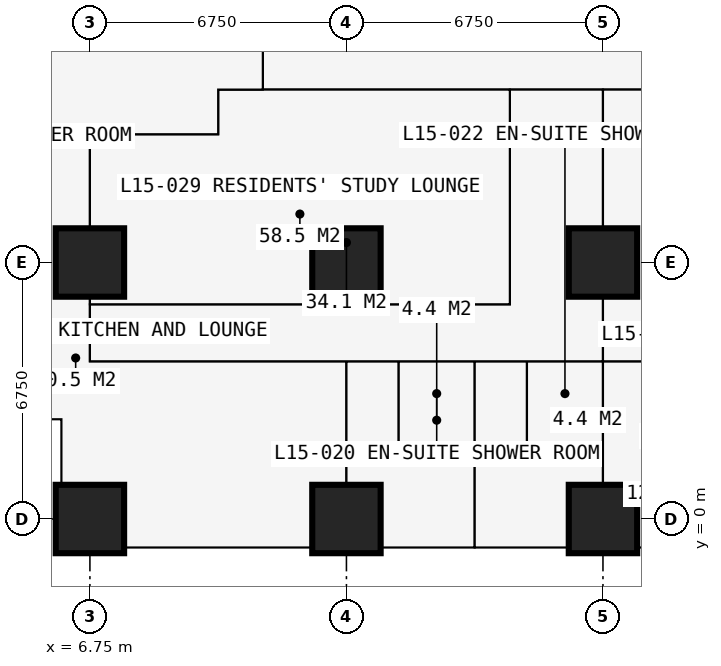
"""IFC4 building model, lengths in metres.
Left out: names, types, materials, properties, quantities, classifications, styles, units other than length and angle.
Written with IfcOpenShell. Run it as: python <this file> out.ifc"""

import sys

from ifc_helpers import new_model, si_unit, direction, frame, frame_2d, origin, origin_2d, place, context, subcontext, project, spatial, rectangle, extrude, element, fill, save


model = new_model("IFC4")
c1 = context("Model", 3, precision=1e-05, world=origin(), true_north=direction((0.0, 1.0)))
c2 = subcontext(c1, "Body", "Model", "MODEL_VIEW")
j1 = project(units=[si_unit("LENGTHUNIT", "METRE"), si_unit("PLANEANGLEUNIT", "RADIAN")], contexts=[c1])
p1 = place(None, origin())
s1 = spatial("IfcSite", under=j1, at=p1, CompositionType="ELEMENT")
p2 = place(p1, origin())
s2 = spatial("IfcBuilding", under=s1, at=p2, CompositionType="ELEMENT")
p3 = place(p2, frame((0.0, 0.0, 57.6)))
s3 = spatial("IfcBuildingStorey", under=s2, at=p3, CompositionType="ELEMENT", Elevation=57.6)
for number, where, z_axis, x_axis in (
    (1, (6.75, 0.0, 0.0), (0.0, 0.0, 1.0), (1.0, 0.0, 0.0)),
    (2, (6.75, 6.75, 0.0), (0.0, 0.0, 1.0), (1.0, 0.0, 0.0)),
    (3, (13.5, 0.0, 0.0), (0.0, 0.0, 1.0), (1.0, 0.0, 0.0)),
    (4, (13.5, 6.75, 0.0), (0.0, 0.0, 1.0), (1.0, 0.0, 0.0)),
    (5, (20.25, 0.0, 0.0), (0.0, 0.0, 1.0), (1.0, 0.0, 0.0)),
    (6, (20.25, 6.75, 0.0), (0.0, 0.0, 1.0), (1.0, 0.0, 0.0)),
):
    element("IfcColumn", number, at=place(p3, frame(where, z_axis=z_axis, x_axis=x_axis)), inside=s3, PredefinedType="COLUMN", context=c2, shape_type="SweptSolid", body=[
        extrude(rectangle(XDim=1.8, YDim=1.8, at=origin_2d()), origin(), (0.0, 0.0, 1.0), 3.6),
    ])
p4 = place(p3, frame((2.625, 2.625, 0.0), z_axis=(0.0, 0.0, 1.0), x_axis=(1.0, 0.0, 0.0)))
e7 = element("IfcWall", 7, at=p4, inside=s3, PredefinedType="SOLIDWALL", context=c2, shape_type="SweptSolid", body=[
    extrude(rectangle(XDim=3.375, YDim=0.3, at=frame_2d((1.688, 0.0))), origin(), (0.0, 0.0, 1.0), 3.375),
])
p5 = place(p4, frame((0.788, 0.0, 0.6)))
e8 = element("IfcOpeningElement", 8, at=p5, cuts=e7, PredefinedType="OPENING", context=c2, shape_type="SweptSolid", body=[
    extrude(rectangle(XDim=1.8, YDim=2.1, at=frame_2d((0.9, 1.05))), frame((0.0, 0.16, 0.0), z_axis=(0.0, -1.0, 0.0), x_axis=(1.0, 0.0, 0.0)), (0.0, 0.0, 1.0), 0.32),
])
p6 = place(p3, frame((6.0, 2.625, 0.0), z_axis=(0.0, 0.0, 1.0), x_axis=(0.0, -1.0, 0.0)))
e9 = element("IfcWall", 9, at=p6, inside=s3, PredefinedType="SOLIDWALL", context=c2, shape_type="SweptSolid", body=[
    extrude(rectangle(XDim=3.375, YDim=0.3, at=frame_2d((1.688, 0.0))), origin(), (0.0, 0.0, 1.0), 3.375),
])
p7 = place(p6, frame((0.343, 0.0, 0.9)))
e10 = element("IfcOpeningElement", 10, at=p7, cuts=e9, PredefinedType="OPENING", context=c2, shape_type="SweptSolid", body=[
    extrude(rectangle(XDim=1.2, YDim=1.8, at=frame_2d((0.6, 0.9))), frame((0.0, 0.16, 0.0), z_axis=(0.0, -1.0, 0.0), x_axis=(1.0, 0.0, 0.0)), (0.0, 0.0, 1.0), 0.32),
])
p8 = place(p3, frame((27.0, -0.75, 0.0), z_axis=(0.0, 0.0, 1.0), x_axis=(-1.0, 0.0, 0.0)))
e11 = element("IfcWall", 11, at=p8, inside=s3, PredefinedType="SOLIDWALL", context=c2, shape_type="SweptSolid", body=[
    extrude(rectangle(XDim=6.75, YDim=0.15, at=frame_2d((3.375, 0.0))), origin(), (0.0, 0.0, 1.0), 3.375),
])
p9 = place(p8, frame((0.962, 0.0, 0.0)))
e12 = element("IfcOpeningElement", 12, at=p9, cuts=e11, PredefinedType="OPENING", context=c2, shape_type="SweptSolid", body=[
    extrude(rectangle(XDim=1.0, YDim=2.2, at=frame_2d((0.5, 1.1))), frame((0.0, 0.085, 0.0), z_axis=(0.0, -1.0, 0.0), x_axis=(1.0, 0.0, 0.0)), (0.0, 0.0, 1.0), 0.17),
])
p10 = place(p8, frame((2.025, 0.0, 0.9)))
e13 = element("IfcOpeningElement", 13, at=p10, cuts=e11, PredefinedType="OPENING", context=c2, shape_type="SweptSolid", body=[
    extrude(rectangle(XDim=1.2, YDim=1.8, at=frame_2d((0.6, 0.9))), frame((0.0, 0.085, 0.0), z_axis=(0.0, -1.0, 0.0), x_axis=(1.0, 0.0, 0.0)), (0.0, 0.0, 1.0), 0.17),
])
p11 = place(p8, frame((4.788, 0.0, 0.0)))
e14 = element("IfcOpeningElement", 14, at=p11, cuts=e11, PredefinedType="OPENING", context=c2, shape_type="SweptSolid", body=[
    extrude(rectangle(XDim=1.0, YDim=2.2, at=frame_2d((0.5, 1.1))), frame((0.0, 0.085, 0.0), z_axis=(0.0, -1.0, 0.0), x_axis=(1.0, 0.0, 0.0)), (0.0, 0.0, 1.0), 0.17),
])
p12 = place(p8, frame((3.525, 0.0, 0.9)))
e15 = element("IfcOpeningElement", 15, at=p12, cuts=e11, PredefinedType="OPENING", context=c2, shape_type="SweptSolid", body=[
    extrude(rectangle(XDim=1.2, YDim=1.8, at=frame_2d((0.6, 0.9))), frame((0.0, 0.085, 0.0), z_axis=(0.0, -1.0, 0.0), x_axis=(1.0, 0.0, 0.0)), (0.0, 0.0, 1.0), 0.17),
])
p13 = place(p3, frame((-0.734, 10.125, 0.0), z_axis=(0.0, 0.0, 1.0), x_axis=(1.0, 0.0, 0.0)))
e16 = element("IfcWall", 16, at=p13, inside=s3, PredefinedType="PARTITIONING", context=c2, shape_type="SweptSolid", body=[
    extrude(rectangle(XDim=10.859, YDim=0.15, at=frame_2d((5.429, 0.0))), origin(), (0.0, 0.0, 1.0), 3.375),
])
p14 = place(p3, frame((6.75, 4.15, 0.0), z_axis=(0.0, 0.0, 1.0), x_axis=(0.0, 1.0, 0.0)))
e17 = element("IfcWall", 17, at=p14, inside=s3, PredefinedType="PARTITIONING", context=c2, shape_type="SweptSolid", body=[
    extrude(rectangle(XDim=5.975, YDim=0.15, at=frame_2d((2.988, 0.0))), origin(), (0.0, 0.0, 1.0), 2.877),
])
p15 = place(p3, frame((6.75, 4.15, 0.0), z_axis=(0.0, 0.0, 1.0), x_axis=(1.0, 0.0, 0.0)))
e18 = element("IfcWall", 18, at=p15, inside=s3, PredefinedType="PARTITIONING", context=c2, shape_type="SweptSolid", body=[
    extrude(rectangle(XDim=23.625, YDim=0.1, at=frame_2d((11.812, 0.0))), origin(), (0.0, 0.0, 1.0), 3.375),
])
p16 = place(p15, frame((2.85, 0.0, 0.0)))
e19 = element("IfcOpeningElement", 19, at=p16, cuts=e18, PredefinedType="OPENING", context=c2, shape_type="SweptSolid", body=[
    extrude(rectangle(XDim=1.0, YDim=2.2, at=frame_2d((0.5, 1.1))), frame((0.0, 0.06, 0.0), z_axis=(0.0, -1.0, 0.0), x_axis=(1.0, 0.0, 0.0)), (0.0, 0.0, 1.0), 0.12),
])
p17 = place(p15, frame((6.95, 0.0, 0.0)))
e20 = element("IfcOpeningElement", 20, at=p17, cuts=e18, PredefinedType="OPENING", context=c2, shape_type="SweptSolid", body=[
    extrude(rectangle(XDim=0.95, YDim=2.2, at=frame_2d((0.475, 1.1))), frame((0.0, 0.06, 0.0), z_axis=(0.0, -1.0, 0.0), x_axis=(1.0, 0.0, 0.0)), (0.0, 0.0, 1.0), 0.12),
])
p18 = place(p15, frame((10.375, 0.0, 0.0)))
e21 = element("IfcOpeningElement", 21, at=p18, cuts=e18, PredefinedType="OPENING", context=c2, shape_type="SweptSolid", body=[
    extrude(rectangle(XDim=0.95, YDim=2.2, at=frame_2d((0.475, 1.1))), frame((0.0, 0.06, 0.0), z_axis=(0.0, -1.0, 0.0), x_axis=(1.0, 0.0, 0.0)), (0.0, 0.0, 1.0), 0.12),
])
p19 = place(p15, frame((18.475, 0.0, 0.0)))
e22 = element("IfcOpeningElement", 22, at=p19, cuts=e18, PredefinedType="OPENING", context=c2, shape_type="SweptSolid", body=[
    extrude(rectangle(XDim=0.95, YDim=2.2, at=frame_2d((0.475, 1.1))), frame((0.0, 0.06, 0.0), z_axis=(0.0, -1.0, 0.0), x_axis=(1.0, 0.0, 0.0)), (0.0, 0.0, 1.0), 0.12),
])
p20 = place(p15, frame((13.7, 0.0, 0.0)))
e23 = element("IfcOpeningElement", 23, at=p20, cuts=e18, PredefinedType="OPENING", context=c2, shape_type="SweptSolid", body=[
    extrude(rectangle(XDim=0.95, YDim=2.2, at=frame_2d((0.475, 1.1))), frame((0.0, 0.06, 0.0), z_axis=(0.0, -1.0, 0.0), x_axis=(1.0, 0.0, 0.0)), (0.0, 0.0, 1.0), 0.12),
])
p21 = place(p3, frame((6.75, 5.65, 0.0), z_axis=(0.0, 0.0, 1.0), x_axis=(1.0, 0.0, 0.0)))
e24 = element("IfcWall", 24, at=p21, inside=s3, PredefinedType="PARTITIONING", context=c2, shape_type="SweptSolid", body=[
    extrude(rectangle(XDim=11.05, YDim=0.15, at=frame_2d((5.525, 0.0))), origin(), (0.0, 0.0, 1.0), 3.375),
])
p22 = place(p3, frame((10.125, 10.125, 0.0), z_axis=(0.0, 0.0, 1.0), x_axis=(0.0, 1.0, 0.0)))
e25 = element("IfcWall", 25, at=p22, inside=s3, PredefinedType="PARTITIONING", context=c2, shape_type="SweptSolid", body=[
    extrude(rectangle(XDim=1.175, YDim=0.15, at=frame_2d((0.587, 0.0))), origin(), (0.0, 0.0, 1.0), 3.375),
])
p23 = place(p3, frame((10.125, 11.3, 0.0), z_axis=(0.0, 0.0, 1.0), x_axis=(1.0, 0.0, 0.0)))
e26 = element("IfcWall", 26, at=p23, inside=s3, PredefinedType="PARTITIONING", context=c2, shape_type="SweptSolid", body=[
    extrude(rectangle(XDim=20.675, YDim=0.15, at=frame_2d((10.337, 0.0))), origin(), (0.0, 0.0, 1.0), 3.375),
])
p24 = place(p23, frame((8.375, 0.0, 0.0)))
e27 = element("IfcOpeningElement", 27, at=p24, cuts=e26, PredefinedType="OPENING", context=c2, shape_type="SweptSolid", body=[
    extrude(rectangle(XDim=1.0, YDim=2.2, at=frame_2d((0.5, 1.1))), frame((0.0, 0.085, 0.0), z_axis=(0.0, -1.0, 0.0), x_axis=(1.0, 0.0, 0.0)), (0.0, 0.0, 1.0), 0.17),
])
p25 = place(p23, frame((10.975, 0.0, 0.0)))
e28 = element("IfcOpeningElement", 28, at=p25, cuts=e26, PredefinedType="OPENING", context=c2, shape_type="SweptSolid", body=[
    extrude(rectangle(XDim=1.0, YDim=2.2, at=frame_2d((0.5, 1.1))), frame((0.0, 0.085, 0.0), z_axis=(0.0, -1.0, 0.0), x_axis=(1.0, 0.0, 0.0)), (0.0, 0.0, 1.0), 0.17),
])
p26 = place(p23, frame((3.925, 0.0, 0.0)))
e29 = element("IfcOpeningElement", 29, at=p26, cuts=e26, PredefinedType="OPENING", context=c2, shape_type="SweptSolid", body=[
    extrude(rectangle(XDim=0.95, YDim=2.2, at=frame_2d((0.475, 1.1))), frame((0.0, 0.085, 0.0), z_axis=(0.0, -1.0, 0.0), x_axis=(1.0, 0.0, 0.0)), (0.0, 0.0, 1.0), 0.17),
])
p27 = place(p3, frame((11.3, 11.3, 0.0), z_axis=(0.0, 0.0, 1.0), x_axis=(0.0, 1.0, 0.0)))
e30 = element("IfcWall", 30, at=p27, inside=s3, PredefinedType="PARTITIONING", context=c2, shape_type="SweptSolid", body=[
    extrude(rectangle(XDim=19.075, YDim=0.15, at=frame_2d((9.538, 0.0))), origin(), (0.0, 0.0, 1.0), 3.375),
])
p28 = place(p27, frame((12.875, 0.0, 0.0)))
e31 = element("IfcOpeningElement", 31, at=p28, cuts=e30, PredefinedType="OPENING", context=c2, shape_type="SweptSolid", body=[
    extrude(rectangle(XDim=1.0, YDim=2.2, at=frame_2d((0.5, 1.1))), frame((0.0, 0.085, 0.0), z_axis=(0.0, -1.0, 0.0), x_axis=(1.0, 0.0, 0.0)), (0.0, 0.0, 1.0), 0.17),
])
p29 = place(p27, frame((10.438, 0.0, 0.0)))
e32 = element("IfcOpeningElement", 32, at=p29, cuts=e30, PredefinedType="OPENING", context=c2, shape_type="SweptSolid", body=[
    extrude(rectangle(XDim=1.0, YDim=2.2, at=frame_2d((0.5, 1.1))), frame((0.0, 0.085, 0.0), z_axis=(0.0, -1.0, 0.0), x_axis=(1.0, 0.0, 0.0)), (0.0, 0.0, 1.0), 0.17),
])
p30 = place(p27, frame((15.675, 0.0, 0.0)))
e33 = element("IfcOpeningElement", 33, at=p30, cuts=e30, PredefinedType="OPENING", context=c2, shape_type="SweptSolid", body=[
    extrude(rectangle(XDim=0.95, YDim=2.2, at=frame_2d((0.475, 1.1))), frame((0.0, 0.085, 0.0), z_axis=(0.0, -1.0, 0.0), x_axis=(1.0, 0.0, 0.0)), (0.0, 0.0, 1.0), 0.17),
])
p31 = place(p3, frame((13.5, -0.734, 0.0), z_axis=(0.0, 0.0, 1.0), x_axis=(0.0, 1.0, 0.0)))
e34 = element("IfcWall", 34, at=p31, inside=s3, PredefinedType="PARTITIONING", context=c2, shape_type="SweptSolid", body=[
    extrude(rectangle(XDim=4.884, YDim=0.15, at=frame_2d((2.442, 0.0))), origin(), (0.0, 0.0, 1.0), 2.61),
])
p32 = place(p3, frame((14.875, 1.95, 0.0), z_axis=(0.0, 0.0, 1.0), x_axis=(0.0, 1.0, 0.0)))
e35 = element("IfcWall", 35, at=p32, inside=s3, PredefinedType="PARTITIONING", context=c2, shape_type="SweptSolid", body=[
    extrude(rectangle(XDim=2.2, YDim=0.1, at=frame_2d((1.1, 0.0))), origin(), (0.0, 0.0, 1.0), 3.375),
])
p33 = place(p32, frame((0.65, 0.0, 0.0)))
e36 = element("IfcOpeningElement", 36, at=p33, cuts=e35, PredefinedType="OPENING", context=c2, shape_type="SweptSolid", body=[
    extrude(rectangle(XDim=0.9, YDim=2.2, at=frame_2d((0.45, 1.1))), frame((0.0, 0.06, 0.0), z_axis=(0.0, -1.0, 0.0), x_axis=(1.0, 0.0, 0.0)), (0.0, 0.0, 1.0), 0.12),
])
p34 = place(p3, frame((14.875, 1.95, 0.0), z_axis=(0.0, 0.0, 1.0), x_axis=(1.0, 0.0, 0.0)))
e37 = element("IfcWall", 37, at=p34, inside=s3, PredefinedType="PARTITIONING", context=c2, shape_type="SweptSolid", body=[
    extrude(rectangle(XDim=2.0, YDim=0.1, at=frame_2d((1.0, 0.0))), origin(), (0.0, 0.0, 1.0), 3.375),
])
p35 = place(p3, frame((16.875, -0.734, 0.0), z_axis=(0.0, 0.0, 1.0), x_axis=(0.0, 1.0, 0.0)))
e38 = element("IfcWall", 38, at=p35, inside=s3, PredefinedType="PARTITIONING", context=c2, shape_type="SweptSolid", body=[
    extrude(rectangle(XDim=4.884, YDim=0.175, at=frame_2d((2.442, 0.0))), origin(), (0.0, 0.0, 1.0), 3.375),
])
p36 = place(p3, frame((17.8, 5.65, 0.0), z_axis=(0.0, 0.0, 1.0), x_axis=(0.0, 1.0, 0.0)))
e39 = element("IfcWall", 39, at=p36, inside=s3, PredefinedType="PARTITIONING", context=c2, shape_type="SweptSolid", body=[
    extrude(rectangle(XDim=5.65, YDim=0.15, at=frame_2d((2.825, 0.0))), origin(), (0.0, 0.0, 1.0), 3.375),
])
p37 = place(p3, frame((18.25, 1.95, 0.0), z_axis=(0.0, 0.0, 1.0), x_axis=(0.0, 1.0, 0.0)))
e40 = element("IfcWall", 40, at=p37, inside=s3, PredefinedType="PARTITIONING", context=c2, shape_type="SweptSolid", body=[
    extrude(rectangle(XDim=2.2, YDim=0.1, at=frame_2d((1.1, 0.0))), origin(), (0.0, 0.0, 1.0), 3.375),
])
p38 = place(p37, frame((0.65, 0.0, 0.0)))
e41 = element("IfcOpeningElement", 41, at=p38, cuts=e40, PredefinedType="OPENING", context=c2, shape_type="SweptSolid", body=[
    extrude(rectangle(XDim=0.9, YDim=2.2, at=frame_2d((0.45, 1.1))), frame((0.0, 0.06, 0.0), z_axis=(0.0, -1.0, 0.0), x_axis=(1.0, 0.0, 0.0)), (0.0, 0.0, 1.0), 0.12),
])
p39 = place(p3, frame((18.25, 1.95, 0.0), z_axis=(0.0, 0.0, 1.0), x_axis=(1.0, 0.0, 0.0)))
e42 = element("IfcWall", 42, at=p39, inside=s3, PredefinedType="PARTITIONING", context=c2, shape_type="SweptSolid", body=[
    extrude(rectangle(XDim=2.0, YDim=0.1, at=frame_2d((1.0, 0.0))), origin(), (0.0, 0.0, 1.0), 3.375),
])
p40 = place(p3, frame((20.25, -0.734, 0.0), z_axis=(0.0, 0.0, 1.0), x_axis=(0.0, 1.0, 0.0)))
e43 = element("IfcWall", 43, at=p40, inside=s3, PredefinedType="PARTITIONING", context=c2, shape_type="SweptSolid", body=[
    extrude(rectangle(XDim=12.034, YDim=0.15, at=frame_2d((6.017, 0.0))), origin(), (0.0, 0.0, 1.0), 2.61),
])
p41 = place(p7, origin())
e44 = element("IfcWindow", 44, at=p41, inside=s3, PartitioningType="SINGLE_PANEL", PredefinedType="WINDOW", context=c2, shape_type="SweptSolid", body=[
    extrude(rectangle(XDim=1.2, YDim=1.8, at=frame_2d((0.6, 0.9))), frame((0.0, 0.03, 0.0), z_axis=(0.0, -1.0, 0.0), x_axis=(1.0, 0.0, 0.0)), (0.0, 0.0, 1.0), 0.06),
])
fill(e10, e44)
p42 = place(p11, origin())
e45 = element("IfcDoor", 45, at=p42, inside=s3, OperationType="SINGLE_SWING_RIGHT", PredefinedType="DOOR", context=c2, shape_type="SweptSolid", body=[
    extrude(rectangle(XDim=1.0, YDim=2.2, at=frame_2d((0.5, 1.1))), frame((0.0, 0.025, 0.0), z_axis=(0.0, -1.0, 0.0), x_axis=(1.0, 0.0, 0.0)), (0.0, 0.0, 1.0), 0.05),
])
fill(e14, e45)
p43 = place(p16, origin())
e46 = element("IfcDoor", 46, at=p43, inside=s3, OperationType="SINGLE_SWING_LEFT", PredefinedType="DOOR", context=c2, shape_type="SweptSolid", body=[
    extrude(rectangle(XDim=1.0, YDim=2.2, at=frame_2d((0.5, 1.1))), frame((0.0, 0.025, 0.0), z_axis=(0.0, -1.0, 0.0), x_axis=(1.0, 0.0, 0.0)), (0.0, 0.0, 1.0), 0.05),
])
fill(e19, e46)
p44 = place(p17, origin())
e47 = element("IfcDoor", 47, at=p44, inside=s3, OperationType="SINGLE_SWING_LEFT", PredefinedType="DOOR", context=c2, shape_type="SweptSolid", body=[
    extrude(rectangle(XDim=0.95, YDim=2.2, at=frame_2d((0.475, 1.1))), frame((0.0, 0.025, 0.0), z_axis=(0.0, -1.0, 0.0), x_axis=(1.0, 0.0, 0.0)), (0.0, 0.0, 1.0), 0.05),
])
fill(e20, e47)
p45 = place(p33, origin())
e48 = element("IfcDoor", 48, at=p45, inside=s3, OperationType="SINGLE_SWING_RIGHT", PredefinedType="DOOR", context=c2, shape_type="SweptSolid", body=[
    extrude(rectangle(XDim=0.9, YDim=2.2, at=frame_2d((0.45, 1.1))), frame((0.0, 0.025, 0.0), z_axis=(0.0, -1.0, 0.0), x_axis=(1.0, 0.0, 0.0)), (0.0, 0.0, 1.0), 0.05),
])
fill(e36, e48)
p46 = place(p18, origin())
e49 = element("IfcDoor", 49, at=p46, inside=s3, OperationType="SINGLE_SWING_LEFT", PredefinedType="DOOR", context=c2, shape_type="SweptSolid", body=[
    extrude(rectangle(XDim=0.95, YDim=2.2, at=frame_2d((0.475, 1.1))), frame((0.0, 0.025, 0.0), z_axis=(0.0, -1.0, 0.0), x_axis=(1.0, 0.0, 0.0)), (0.0, 0.0, 1.0), 0.05),
])
fill(e21, e49)
p47 = place(p38, origin())
e50 = element("IfcDoor", 50, at=p47, inside=s3, OperationType="SINGLE_SWING_RIGHT", PredefinedType="DOOR", context=c2, shape_type="SweptSolid", body=[
    extrude(rectangle(XDim=0.9, YDim=2.2, at=frame_2d((0.45, 1.1))), frame((0.0, 0.025, 0.0), z_axis=(0.0, -1.0, 0.0), x_axis=(1.0, 0.0, 0.0)), (0.0, 0.0, 1.0), 0.05),
])
fill(e41, e50)
p48 = place(p24, origin())
e51 = element("IfcDoor", 51, at=p48, inside=s3, OperationType="SINGLE_SWING_LEFT", PredefinedType="DOOR", context=c2, shape_type="SweptSolid", body=[
    extrude(rectangle(XDim=1.0, YDim=2.2, at=frame_2d((0.5, 1.1))), frame((0.0, 0.025, 0.0), z_axis=(0.0, -1.0, 0.0), x_axis=(1.0, 0.0, 0.0)), (0.0, 0.0, 1.0), 0.05),
])
fill(e27, e51)
p49 = place(p20, origin())
e52 = element("IfcDoor", 52, at=p49, inside=s3, OperationType="SINGLE_SWING_LEFT", PredefinedType="DOOR", context=c2, shape_type="SweptSolid", body=[
    extrude(rectangle(XDim=0.95, YDim=2.2, at=frame_2d((0.475, 1.1))), frame((0.0, 0.025, 0.0), z_axis=(0.0, -1.0, 0.0), x_axis=(1.0, 0.0, 0.0)), (0.0, 0.0, 1.0), 0.05),
])
fill(e23, e52)
p50 = place(p25, origin())
e53 = element("IfcDoor", 53, at=p50, inside=s3, OperationType="SINGLE_SWING_LEFT", PredefinedType="DOOR", context=c2, shape_type="SweptSolid", body=[
    extrude(rectangle(XDim=1.0, YDim=2.2, at=frame_2d((0.5, 1.1))), frame((0.0, 0.025, 0.0), z_axis=(0.0, -1.0, 0.0), x_axis=(1.0, 0.0, 0.0)), (0.0, 0.0, 1.0), 0.05),
])
fill(e28, e53)
p51 = place(p26, origin())
e54 = element("IfcDoor", 54, at=p51, inside=s3, OperationType="SINGLE_SWING_LEFT", PredefinedType="DOOR", context=c2, shape_type="SweptSolid", body=[
    extrude(rectangle(XDim=0.95, YDim=2.2, at=frame_2d((0.475, 1.1))), frame((0.0, 0.025, 0.0), z_axis=(0.0, -1.0, 0.0), x_axis=(1.0, 0.0, 0.0)), (0.0, 0.0, 1.0), 0.05),
])
fill(e29, e54)
save(model, sys.argv[1])
